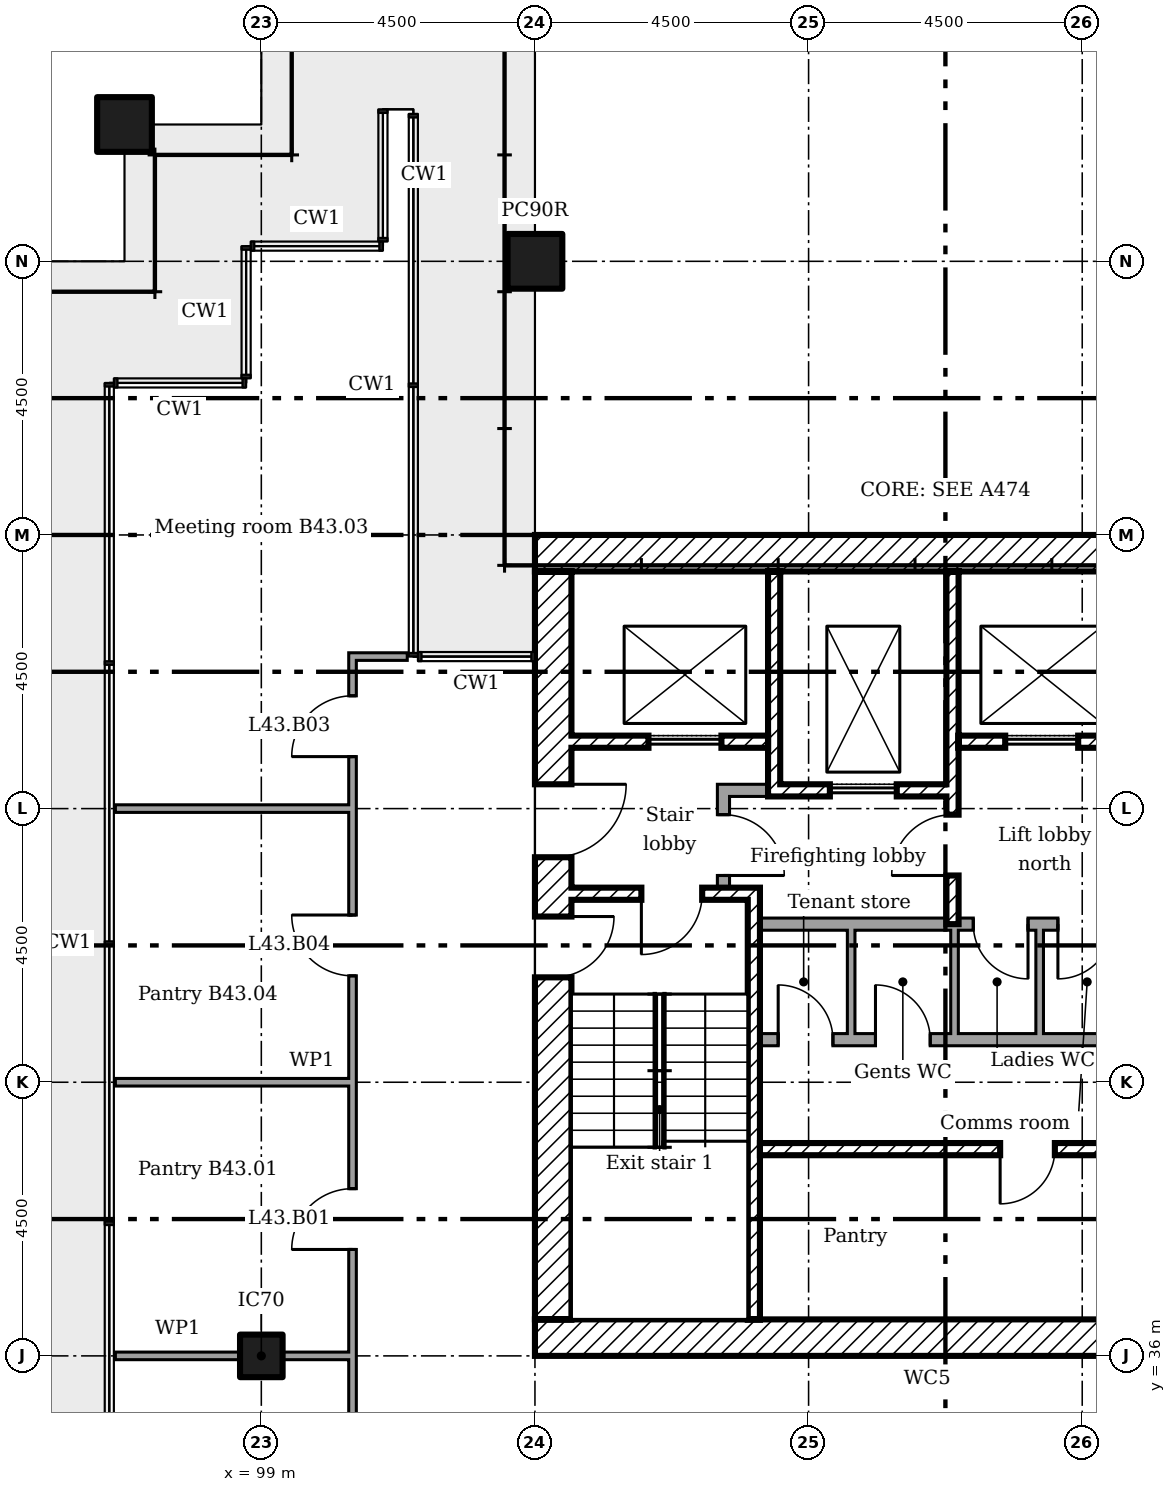
"""IFC4 building model, lengths in metres.
Left out: names, types, materials, properties, quantities, classifications, styles, units other than length and angle.
Written with IfcOpenShell. Run it as: python <this file> out.ifc"""

import sys

from ifc_helpers import new_model, si_unit, direction, frame, frame_2d, origin, origin_2d, place, context, subcontext, project, spatial, rectangle, extrude, element, fill, save


model = new_model("IFC4")
c1 = context("Model", 3, precision=1e-05, world=origin(), true_north=direction((0.0, 1.0)))
c2 = subcontext(c1, "Body", "Model", "MODEL_VIEW")
j1 = project(units=[si_unit("LENGTHUNIT", "METRE"), si_unit("PLANEANGLEUNIT", "RADIAN")], contexts=[c1])
p1 = place(None, origin())
s1 = spatial("IfcSite", under=j1, at=p1, CompositionType="ELEMENT")
p2 = place(p1, origin())
s2 = spatial("IfcBuilding", under=s1, at=p2, CompositionType="ELEMENT")
p3 = place(p2, frame((0.0, 0.0, 172.6)))
s3 = spatial("IfcBuildingStorey", under=s2, at=p3, CompositionType="ELEMENT", Elevation=172.6)
for number, where in (
    (1, (103.5, 54.0, 0.0)),
    (2, (96.75, 56.25, 0.0)),
):
    element("IfcColumn", number, at=place(p3, frame(where)), inside=s3, PredefinedType="COLUMN", context=c2, shape_type="SweptSolid", body=[
        extrude(rectangle(XDim=0.9, YDim=0.9, at=origin_2d()), origin(), (0.0, 0.0, 1.0), 3.6),
    ])
p4 = place(p3, frame((99.0, 36.0, 0.0)))
e3 = element("IfcColumn", 3, at=p4, inside=s3, PredefinedType="COLUMN", context=c2, shape_type="SweptSolid", body=[
    extrude(rectangle(XDim=0.7, YDim=0.7, at=origin_2d()), origin(), (0.0, 0.0, 1.0), 3.6),
])
for number, where in (
    (4, (103.5, 49.2, 0.0)),
    (5, (103.5, 36.3, 0.0)),
):
    element("IfcWall", number, at=place(p3, frame(where)), inside=s3, PredefinedType="SHEAR", context=c2, shape_type="SweptSolid", body=[
        extrude(rectangle(XDim=12.9, YDim=0.6, at=frame_2d((6.45, 0.0))), origin(), (0.0, 0.0, 1.0), 3.35),
    ])
p5 = place(p3, frame((103.8, 36.6, 0.0), z_axis=(0.0, 0.0, 1.0), x_axis=(0.0, 1.0, 0.0)))
e6 = element("IfcWall", 6, at=p5, inside=s3, PredefinedType="SHEAR", context=c2, shape_type="SweptSolid", body=[
    extrude(rectangle(XDim=12.3, YDim=0.6, at=frame_2d((6.15, 0.0))), origin(), (0.0, 0.0, 1.0), 3.35),
])
p6 = place(p5, frame((7.6, 0.0, 0.0)))
e7 = element("IfcOpeningElement", 7, at=p6, cuts=e6, PredefinedType="OPENING", context=c2, shape_type="SweptSolid", body=[
    extrude(rectangle(XDim=1.2, YDim=2.1, at=frame_2d((0.6, 1.05))), frame((0.0, 0.31, 0.0), z_axis=(0.0, -1.0, 0.0), x_axis=(1.0, 0.0, 0.0)), (0.0, 0.0, 1.0), 0.62),
])
p7 = place(p5, frame((5.625, 0.0, 0.0)))
e8 = element("IfcOpeningElement", 8, at=p7, cuts=e6, PredefinedType="OPENING", context=c2, shape_type="SweptSolid", body=[
    extrude(rectangle(XDim=1.0, YDim=2.1, at=frame_2d((0.5, 1.05))), frame((0.0, 0.31, 0.0), z_axis=(0.0, -1.0, 0.0), x_axis=(1.0, 0.0, 0.0)), (0.0, 0.0, 1.0), 0.62),
])
p8 = place(p3, frame((107.433, 48.9, 0.0), z_axis=(0.0, 0.0, 1.0), x_axis=(0.0, -1.0, 0.0)))
e9 = element("IfcWall", 9, at=p8, inside=s3, PredefinedType="SHEAR", context=c2, shape_type="SweptSolid", body=[
    extrude(rectangle(XDim=3.7, YDim=0.2, at=frame_2d((1.85, 0.0))), origin(), (0.0, 0.0, 1.0), 3.35),
])
p9 = place(p3, frame((110.367, 48.9, 0.0), z_axis=(0.0, 0.0, 1.0), x_axis=(0.0, -1.0, 0.0)))
e10 = element("IfcWall", 10, at=p9, inside=s3, PredefinedType="SHEAR", context=c2, shape_type="SweptSolid", body=[
    extrude(rectangle(XDim=5.8, YDim=0.2, at=frame_2d((2.9, 0.0))), origin(), (0.0, 0.0, 1.0), 3.35),
])
p10 = place(p9, frame((4.0, 0.0, 0.0)))
e11 = element("IfcOpeningElement", 11, at=p10, cuts=e10, PredefinedType="OPENING", context=c2, shape_type="SweptSolid", body=[
    extrude(rectangle(XDim=1.0, YDim=2.1, at=frame_2d((0.5, 1.05))), frame((0.0, 0.11, 0.0), z_axis=(0.0, -1.0, 0.0), x_axis=(1.0, 0.0, 0.0)), (0.0, 0.0, 1.0), 0.22),
])
p11 = place(p3, frame((106.5, 45.3, 0.0)))
e12 = element("IfcWall", 12, at=p11, inside=s3, PredefinedType="PARTITIONING", context=c2, shape_type="SweptSolid", body=[
    extrude(rectangle(XDim=0.833, YDim=0.2, at=frame_2d((0.417, 0.0))), origin(), (0.0, 0.0, 1.0), 3.35),
])
p12 = place(p3, frame((106.6, 43.7, 0.0), z_axis=(0.0, 0.0, 1.0), x_axis=(0.0, 1.0, 0.0)))
e13 = element("IfcWall", 13, at=p12, inside=s3, PredefinedType="PARTITIONING", context=c2, shape_type="SweptSolid", body=[
    extrude(rectangle(XDim=1.5, YDim=0.2, at=frame_2d((0.75, 0.0))), origin(), (0.0, 0.0, 1.0), 3.35),
])
p13 = place(p12, frame((0.2, 0.0, 0.0)))
e14 = element("IfcOpeningElement", 14, at=p13, cuts=e13, PredefinedType="OPENING", context=c2, shape_type="SweptSolid", body=[
    extrude(rectangle(XDim=1.0, YDim=2.1, at=frame_2d((0.5, 1.05))), frame((0.0, 0.11, 0.0), z_axis=(0.0, -1.0, 0.0), x_axis=(1.0, 0.0, 0.0)), (0.0, 0.0, 1.0), 0.22),
])
p14 = place(p3, frame((104.1, 46.1, 0.0)))
e15 = element("IfcWall", 15, at=p14, inside=s3, PredefinedType="SHEAR", context=c2, shape_type="SweptSolid", body=[
    extrude(rectangle(XDim=3.233, YDim=0.2, at=frame_2d((1.617, 0.0))), origin(), (0.0, 0.0, 1.0), 3.35),
])
p15 = place(p14, frame((1.267, 0.0, 0.0)))
e16 = element("IfcOpeningElement", 16, at=p15, cuts=e15, PredefinedType="OPENING", context=c2, shape_type="SweptSolid", body=[
    extrude(rectangle(XDim=1.2, YDim=2.1, at=frame_2d((0.6, 1.05))), frame((0.0, 0.11, 0.0), z_axis=(0.0, -1.0, 0.0), x_axis=(1.0, 0.0, 0.0)), (0.0, 0.0, 1.0), 0.22),
])
p16 = place(p3, frame((110.467, 46.1, 0.0)))
e17 = element("IfcWall", 17, at=p16, inside=s3, PredefinedType="SHEAR", context=c2, shape_type="SweptSolid", body=[
    extrude(rectangle(XDim=2.833, YDim=0.2, at=frame_2d((1.417, 0.0))), origin(), (0.0, 0.0, 1.0), 3.35),
])
p17 = place(p16, frame((0.767, 0.0, 0.0)))
e18 = element("IfcOpeningElement", 18, at=p17, cuts=e17, PredefinedType="OPENING", context=c2, shape_type="SweptSolid", body=[
    extrude(rectangle(XDim=1.2, YDim=2.1, at=frame_2d((0.6, 1.05))), frame((0.0, 0.11, 0.0), z_axis=(0.0, -1.0, 0.0), x_axis=(1.0, 0.0, 0.0)), (0.0, 0.0, 1.0), 0.22),
])
p18 = place(p3, frame((107.533, 45.3, 0.0)))
e19 = element("IfcWall", 19, at=p18, inside=s3, PredefinedType="SHEAR", context=c2, shape_type="SweptSolid", body=[
    extrude(rectangle(XDim=2.733, YDim=0.2, at=frame_2d((1.367, 0.0))), origin(), (0.0, 0.0, 1.0), 3.35),
])
p19 = place(p18, frame((0.817, 0.0, 0.0)))
e20 = element("IfcOpeningElement", 20, at=p19, cuts=e19, PredefinedType="OPENING", context=c2, shape_type="SweptSolid", body=[
    extrude(rectangle(XDim=1.1, YDim=2.1, at=frame_2d((0.55, 1.05))), frame((0.0, 0.11, 0.0), z_axis=(0.0, -1.0, 0.0), x_axis=(1.0, 0.0, 0.0)), (0.0, 0.0, 1.0), 0.22),
])
p20 = place(p3, frame((107.2, 39.4, 0.0)))
e21 = element("IfcWall", 21, at=p20, inside=s3, PredefinedType="SHEAR", context=c2, shape_type="SweptSolid", body=[
    extrude(rectangle(XDim=9.2, YDim=0.2, at=frame_2d((4.6, 0.0))), origin(), (0.0, 0.0, 1.0), 3.35),
])
p21 = place(p20, frame((3.95, 0.0, 0.0)))
e22 = element("IfcOpeningElement", 22, at=p21, cuts=e21, PredefinedType="OPENING", context=c2, shape_type="SweptSolid", body=[
    extrude(rectangle(XDim=0.9, YDim=2.1, at=frame_2d((0.45, 1.05))), frame((0.0, 0.11, 0.0), z_axis=(0.0, -1.0, 0.0), x_axis=(1.0, 0.0, 0.0)), (0.0, 0.0, 1.0), 0.22),
])
p22 = place(p3, frame((107.1, 36.6, 0.0), z_axis=(0.0, 0.0, 1.0), x_axis=(0.0, 1.0, 0.0)))
e23 = element("IfcWall", 23, at=p22, inside=s3, PredefinedType="SHEAR", context=c2, shape_type="SweptSolid", body=[
    extrude(rectangle(XDim=7.1, YDim=0.2, at=frame_2d((3.55, 0.0))), origin(), (0.0, 0.0, 1.0), 3.35),
])
p23 = place(p3, frame((104.1, 43.6, 0.0)))
e24 = element("IfcWall", 24, at=p23, inside=s3, PredefinedType="SHEAR", context=c2, shape_type="SweptSolid", body=[
    extrude(rectangle(XDim=2.9, YDim=0.2, at=frame_2d((1.45, 0.0))), origin(), (0.0, 0.0, 1.0), 3.35),
])
p24 = place(p23, frame((1.15, 0.0, 0.0)))
e25 = element("IfcOpeningElement", 25, at=p24, cuts=e24, PredefinedType="OPENING", context=c2, shape_type="SweptSolid", body=[
    extrude(rectangle(XDim=1.0, YDim=2.1, at=frame_2d((0.5, 1.05))), frame((0.0, 0.11, 0.0), z_axis=(0.0, -1.0, 0.0), x_axis=(1.0, 0.0, 0.0)), (0.0, 0.0, 1.0), 0.22),
])
p25 = place(p3, frame((107.2, 43.1, 0.0)))
e26 = element("IfcWall", 26, at=p25, inside=s3, PredefinedType="PARTITIONING", context=c2, shape_type="SweptSolid", body=[
    extrude(rectangle(XDim=6.1, YDim=0.2, at=frame_2d((3.05, 0.0))), origin(), (0.0, 0.0, 1.0), 3.35),
])
p26 = place(p25, frame((3.509, 0.0, 0.0)))
e27 = element("IfcOpeningElement", 27, at=p26, cuts=e26, PredefinedType="OPENING", context=c2, shape_type="SweptSolid", body=[
    extrude(rectangle(XDim=0.9, YDim=2.1, at=frame_2d((0.45, 1.05))), frame((0.0, 0.11, 0.0), z_axis=(0.0, -1.0, 0.0), x_axis=(1.0, 0.0, 0.0)), (0.0, 0.0, 1.0), 0.22),
])
p27 = place(p25, frame((4.9, 0.0, 0.0)))
e28 = element("IfcOpeningElement", 28, at=p27, cuts=e26, PredefinedType="OPENING", context=c2, shape_type="SweptSolid", body=[
    extrude(rectangle(XDim=0.9, YDim=2.1, at=frame_2d((0.45, 1.05))), frame((0.0, 0.11, 0.0), z_axis=(0.0, -1.0, 0.0), x_axis=(1.0, 0.0, 0.0)), (0.0, 0.0, 1.0), 0.22),
])
p28 = place(p3, frame((107.2, 41.2, 0.0)))
e29 = element("IfcWall", 29, at=p28, inside=s3, PredefinedType="PARTITIONING", context=c2, shape_type="SweptSolid", body=[
    extrude(rectangle(XDim=6.1, YDim=0.2, at=frame_2d((3.05, 0.0))), origin(), (0.0, 0.0, 1.0), 3.35),
])
p29 = place(p28, frame((0.3, 0.0, 0.0)))
e30 = element("IfcOpeningElement", 30, at=p29, cuts=e29, PredefinedType="OPENING", context=c2, shape_type="SweptSolid", body=[
    extrude(rectangle(XDim=0.9, YDim=2.1, at=frame_2d((0.45, 1.05))), frame((0.0, 0.11, 0.0), z_axis=(0.0, -1.0, 0.0), x_axis=(1.0, 0.0, 0.0)), (0.0, 0.0, 1.0), 0.22),
])
p30 = place(p28, frame((1.9, 0.0, 0.0)))
e31 = element("IfcOpeningElement", 31, at=p30, cuts=e29, PredefinedType="OPENING", context=c2, shape_type="SweptSolid", body=[
    extrude(rectangle(XDim=0.9, YDim=2.1, at=frame_2d((0.45, 1.05))), frame((0.0, 0.11, 0.0), z_axis=(0.0, -1.0, 0.0), x_axis=(1.0, 0.0, 0.0)), (0.0, 0.0, 1.0), 0.22),
])
for number, where, z_axis, x_axis in (
    (32, (108.7, 41.3, 0.0), (0.0, 0.0, 1.0), (0.0, 1.0, 0.0)),
    (33, (110.4, 41.3, 0.0), (0.0, 0.0, 1.0), (0.0, 1.0, 0.0)),
    (34, (111.8, 41.3, 0.0), (0.0, 0.0, 1.0), (0.0, 1.0, 0.0)),
):
    element("IfcWall", number, at=place(p3, frame(where, z_axis=z_axis, x_axis=x_axis)), inside=s3, PredefinedType="PARTITIONING", context=c2, shape_type="SweptSolid", body=[
        extrude(rectangle(XDim=1.7, YDim=0.125, at=frame_2d((0.85, 0.0))), origin(), (0.0, 0.0, 1.0), 3.35),
    ])
p31 = place(p3, frame((96.6, 36.0, 0.0)))
e35 = element("IfcWall", 35, at=p31, inside=s3, PredefinedType="PARTITIONING", context=c2, shape_type="SweptSolid", body=[
    extrude(rectangle(XDim=2.05, YDim=0.125, at=frame_2d((1.025, 0.0))), origin(), (0.0, 0.0, 1.0), 2.842),
])
p32 = place(p3, frame((99.35, 36.0, 0.0)))
e36 = element("IfcWall", 36, at=p32, inside=s3, PredefinedType="PARTITIONING", context=c2, shape_type="SweptSolid", body=[
    extrude(rectangle(XDim=1.15, YDim=0.125, at=frame_2d((0.575, 0.0))), origin(), (0.0, 0.0, 1.0), 2.842),
])
for number, where in (
    (37, (96.6, 40.5, 0.0)),
    (38, (96.6, 45.0, 0.0)),
):
    element("IfcWall", number, at=place(p3, frame(where)), inside=s3, PredefinedType="PARTITIONING", context=c2, shape_type="SweptSolid", body=[
        extrude(rectangle(XDim=3.9, YDim=0.125, at=frame_2d((1.95, 0.0))), origin(), (0.0, 0.0, 1.0), 2.851),
    ])
p33 = place(p3, frame((100.438, 47.5, 0.0)))
e39 = element("IfcWall", 39, at=p33, inside=s3, PredefinedType="PARTITIONING", context=c2, shape_type="SweptSolid", body=[
    extrude(rectangle(XDim=0.962, YDim=0.125, at=frame_2d((0.481, 0.0))), origin(), (0.0, 0.0, 1.0), 3.45),
])
p34 = place(p3, frame((100.5, 34.262, 0.0), z_axis=(0.0, 0.0, 1.0), x_axis=(0.0, 1.0, 0.0)))
e40 = element("IfcWall", 40, at=p34, inside=s3, PredefinedType="PARTITIONING", context=c2, shape_type="SweptSolid", body=[
    extrude(rectangle(XDim=13.175, YDim=0.125, at=frame_2d((6.587, 0.0))), origin(), (0.0, 0.0, 1.0), 3.45),
])
p35 = place(p34, frame((3.488, 0.0, 0.0)))
e41 = element("IfcOpeningElement", 41, at=p35, cuts=e40, PredefinedType="OPENING", context=c2, shape_type="SweptSolid", body=[
    extrude(rectangle(XDim=1.0, YDim=2.1, at=frame_2d((0.5, 1.05))), frame((0.0, 0.073, 0.0), z_axis=(0.0, -1.0, 0.0), x_axis=(1.0, 0.0, 0.0)), (0.0, 0.0, 1.0), 0.145),
])
p36 = place(p34, frame((11.593, 0.0, 0.0)))
e42 = element("IfcOpeningElement", 42, at=p36, cuts=e40, PredefinedType="OPENING", context=c2, shape_type="SweptSolid", body=[
    extrude(rectangle(XDim=1.0, YDim=2.1, at=frame_2d((0.5, 1.05))), frame((0.0, 0.073, 0.0), z_axis=(0.0, -1.0, 0.0), x_axis=(1.0, 0.0, 0.0)), (0.0, 0.0, 1.0), 0.145),
])
p37 = place(p34, frame((7.988, 0.0, 0.0)))
e43 = element("IfcOpeningElement", 43, at=p37, cuts=e40, PredefinedType="OPENING", context=c2, shape_type="SweptSolid", body=[
    extrude(rectangle(XDim=1.0, YDim=2.1, at=frame_2d((0.5, 1.05))), frame((0.0, 0.073, 0.0), z_axis=(0.0, -1.0, 0.0), x_axis=(1.0, 0.0, 0.0)), (0.0, 0.0, 1.0), 0.145),
])
p38 = place(p6, frame((1.2, 0.0, 0.0), x_axis=(-1.0, 0.0, 0.0)))
e44 = element("IfcDoor", 44, at=p38, inside=s3, OperationType="SINGLE_SWING_RIGHT", PredefinedType="DOOR", context=c2, shape_type="SweptSolid", body=[
    extrude(rectangle(XDim=1.2, YDim=2.1, at=frame_2d((0.6, 1.05))), frame((0.0, 0.025, 0.0), z_axis=(0.0, -1.0, 0.0), x_axis=(1.0, 0.0, 0.0)), (0.0, 0.0, 1.0), 0.05),
])
fill(e7, e44)
p39 = place(p24, frame((1.0, 0.0, 0.0), x_axis=(-1.0, 0.0, 0.0)))
e45 = element("IfcDoor", 45, at=p39, inside=s3, OperationType="SINGLE_SWING_LEFT", PredefinedType="DOOR", context=c2, shape_type="SweptSolid", body=[
    extrude(rectangle(XDim=1.0, YDim=2.1, at=frame_2d((0.5, 1.05))), frame((0.0, 0.025, 0.0), z_axis=(0.0, -1.0, 0.0), x_axis=(1.0, 0.0, 0.0)), (0.0, 0.0, 1.0), 0.05),
])
fill(e25, e45)
p40 = place(p7, frame((1.0, 0.0, 0.0), x_axis=(-1.0, 0.0, 0.0)))
e46 = element("IfcDoor", 46, at=p40, inside=s3, OperationType="SINGLE_SWING_RIGHT", PredefinedType="DOOR", context=c2, shape_type="SweptSolid", body=[
    extrude(rectangle(XDim=1.0, YDim=2.1, at=frame_2d((0.5, 1.05))), frame((0.0, 0.025, 0.0), z_axis=(0.0, -1.0, 0.0), x_axis=(1.0, 0.0, 0.0)), (0.0, 0.0, 1.0), 0.05),
])
fill(e8, e46)
p41 = place(p10, frame((1.0, 0.0, 0.0), x_axis=(-1.0, 0.0, 0.0)))
e47 = element("IfcDoor", 47, at=p41, inside=s3, OperationType="SINGLE_SWING_RIGHT", PredefinedType="DOOR", context=c2, shape_type="SweptSolid", body=[
    extrude(rectangle(XDim=1.0, YDim=2.1, at=frame_2d((0.5, 1.05))), frame((0.0, 0.025, 0.0), z_axis=(0.0, -1.0, 0.0), x_axis=(1.0, 0.0, 0.0)), (0.0, 0.0, 1.0), 0.05),
])
fill(e11, e47)
p42 = place(p13, frame((1.0, 0.0, 0.0), x_axis=(-1.0, 0.0, 0.0)))
e48 = element("IfcDoor", 48, at=p42, inside=s3, OperationType="SINGLE_SWING_LEFT", PredefinedType="DOOR", context=c2, shape_type="SweptSolid", body=[
    extrude(rectangle(XDim=1.0, YDim=2.1, at=frame_2d((0.5, 1.05))), frame((0.0, 0.025, 0.0), z_axis=(0.0, -1.0, 0.0), x_axis=(1.0, 0.0, 0.0)), (0.0, 0.0, 1.0), 0.05),
])
fill(e14, e48)
p43 = place(p21, frame((0.9, 0.0, 0.0), x_axis=(-1.0, 0.0, 0.0)))
e49 = element("IfcDoor", 49, at=p43, inside=s3, OperationType="SINGLE_SWING_LEFT", PredefinedType="DOOR", context=c2, shape_type="SweptSolid", body=[
    extrude(rectangle(XDim=0.9, YDim=2.1, at=frame_2d((0.45, 1.05))), frame((0.0, 0.025, 0.0), z_axis=(0.0, -1.0, 0.0), x_axis=(1.0, 0.0, 0.0)), (0.0, 0.0, 1.0), 0.05),
])
fill(e22, e49)
p44 = place(p29, origin())
e50 = element("IfcDoor", 50, at=p44, inside=s3, OperationType="SINGLE_SWING_RIGHT", PredefinedType="DOOR", context=c2, shape_type="SweptSolid", body=[
    extrude(rectangle(XDim=0.9, YDim=2.1, at=frame_2d((0.45, 1.05))), frame((0.0, 0.025, 0.0), z_axis=(0.0, -1.0, 0.0), x_axis=(1.0, 0.0, 0.0)), (0.0, 0.0, 1.0), 0.05),
])
fill(e30, e50)
p45 = place(p30, origin())
e51 = element("IfcDoor", 51, at=p45, inside=s3, OperationType="SINGLE_SWING_RIGHT", PredefinedType="DOOR", context=c2, shape_type="SweptSolid", body=[
    extrude(rectangle(XDim=0.9, YDim=2.1, at=frame_2d((0.45, 1.05))), frame((0.0, 0.025, 0.0), z_axis=(0.0, -1.0, 0.0), x_axis=(1.0, 0.0, 0.0)), (0.0, 0.0, 1.0), 0.05),
])
fill(e31, e51)
p46 = place(p26, frame((0.9, 0.0, 0.0), x_axis=(-1.0, 0.0, 0.0)))
e52 = element("IfcDoor", 52, at=p46, inside=s3, OperationType="SINGLE_SWING_RIGHT", PredefinedType="DOOR", context=c2, shape_type="SweptSolid", body=[
    extrude(rectangle(XDim=0.9, YDim=2.1, at=frame_2d((0.45, 1.05))), frame((0.0, 0.025, 0.0), z_axis=(0.0, -1.0, 0.0), x_axis=(1.0, 0.0, 0.0)), (0.0, 0.0, 1.0), 0.05),
])
fill(e27, e52)
p47 = place(p27, frame((0.9, 0.0, 0.0), x_axis=(-1.0, 0.0, 0.0)))
e53 = element("IfcDoor", 53, at=p47, inside=s3, OperationType="SINGLE_SWING_LEFT", PredefinedType="DOOR", context=c2, shape_type="SweptSolid", body=[
    extrude(rectangle(XDim=0.9, YDim=2.1, at=frame_2d((0.45, 1.05))), frame((0.0, 0.025, 0.0), z_axis=(0.0, -1.0, 0.0), x_axis=(1.0, 0.0, 0.0)), (0.0, 0.0, 1.0), 0.05),
])
fill(e28, e53)
p48 = place(p19, origin())
e54 = element("IfcDoor", 54, at=p48, inside=s3, OperationType="SLIDING_TO_LEFT", PredefinedType="DOOR", context=c2, shape_type="SweptSolid", body=[
    extrude(rectangle(XDim=1.1, YDim=2.1, at=frame_2d((0.55, 1.05))), frame((0.0, 0.025, 0.0), z_axis=(0.0, -1.0, 0.0), x_axis=(1.0, 0.0, 0.0)), (0.0, 0.0, 1.0), 0.05),
])
fill(e20, e54)
p49 = place(p15, origin())
e55 = element("IfcDoor", 55, at=p49, inside=s3, OperationType="SLIDING_TO_LEFT", PredefinedType="DOOR", context=c2, shape_type="SweptSolid", body=[
    extrude(rectangle(XDim=1.2, YDim=2.1, at=frame_2d((0.6, 1.05))), frame((0.0, 0.025, 0.0), z_axis=(0.0, -1.0, 0.0), x_axis=(1.0, 0.0, 0.0)), (0.0, 0.0, 1.0), 0.05),
])
fill(e16, e55)
p50 = place(p17, origin())
e56 = element("IfcDoor", 56, at=p50, inside=s3, OperationType="SLIDING_TO_LEFT", PredefinedType="DOOR", context=c2, shape_type="SweptSolid", body=[
    extrude(rectangle(XDim=1.2, YDim=2.1, at=frame_2d((0.6, 1.05))), frame((0.0, 0.025, 0.0), z_axis=(0.0, -1.0, 0.0), x_axis=(1.0, 0.0, 0.0)), (0.0, 0.0, 1.0), 0.05),
])
fill(e18, e56)
p51 = place(p35, origin())
e57 = element("IfcDoor", 57, at=p51, inside=s3, OperationType="SINGLE_SWING_RIGHT", PredefinedType="DOOR", context=c2, shape_type="SweptSolid", body=[
    extrude(rectangle(XDim=1.0, YDim=2.1, at=frame_2d((0.5, 1.05))), frame((0.0, 0.025, 0.0), z_axis=(0.0, -1.0, 0.0), x_axis=(1.0, 0.0, 0.0)), (0.0, 0.0, 1.0), 0.05),
])
fill(e41, e57)
p52 = place(p36, origin())
e58 = element("IfcDoor", 58, at=p52, inside=s3, OperationType="SINGLE_SWING_RIGHT", PredefinedType="DOOR", context=c2, shape_type="SweptSolid", body=[
    extrude(rectangle(XDim=1.0, YDim=2.1, at=frame_2d((0.5, 1.05))), frame((0.0, 0.025, 0.0), z_axis=(0.0, -1.0, 0.0), x_axis=(1.0, 0.0, 0.0)), (0.0, 0.0, 1.0), 0.05),
])
fill(e42, e58)
p53 = place(p37, origin())
e59 = element("IfcDoor", 59, at=p53, inside=s3, OperationType="SINGLE_SWING_LEFT", PredefinedType="DOOR", context=c2, shape_type="SweptSolid", body=[
    extrude(rectangle(XDim=1.0, YDim=2.1, at=frame_2d((0.5, 1.05))), frame((0.0, 0.025, 0.0), z_axis=(0.0, -1.0, 0.0), x_axis=(1.0, 0.0, 0.0)), (0.0, 0.0, 1.0), 0.05),
])
fill(e43, e59)
save(model, sys.argv[1])
